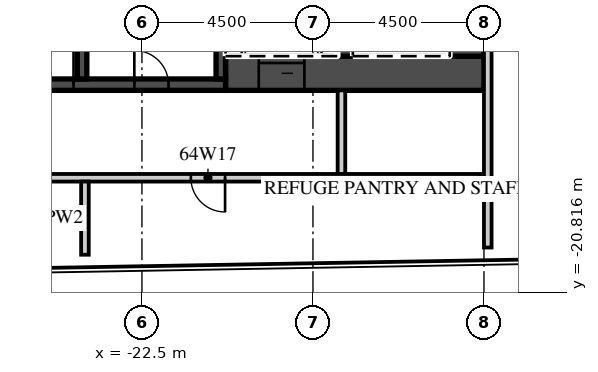
"""IFC4 building model, lengths in metres.
Left out: names, types, materials, properties, quantities, classifications, styles, units other than length and angle.
Written with IfcOpenShell. Run it as: python <this file> out.ifc"""

import sys

from ifc_helpers import new_model, si_unit, direction, frame, frame_2d, origin, place, context, subcontext, project, spatial, rectangle, extrude, element, fill, save


model = new_model("IFC4")
c1 = context("Model", 3, precision=1e-05, world=origin(), true_north=direction((0.0, 1.0)))
c2 = subcontext(c1, "Body", "Model", "MODEL_VIEW")
j1 = project(units=[si_unit("LENGTHUNIT", "METRE"), si_unit("PLANEANGLEUNIT", "RADIAN")], contexts=[c1])
p1 = place(None, origin())
s1 = spatial("IfcSite", under=j1, at=p1, CompositionType="ELEMENT")
p2 = place(p1, origin())
s2 = spatial("IfcBuilding", under=s1, at=p2, CompositionType="ELEMENT")
p3 = place(p2, frame((0.0, 0.0, 257.3)))
s3 = spatial("IfcBuildingStorey", under=s2, at=p3, CompositionType="ELEMENT", Elevation=257.3)
p4 = place(p3, frame((-20.3, -15.05, 0.0), z_axis=(0.0, 0.0, 1.0), x_axis=(1.0, 0.0, 0.0)))
e1 = element("IfcWall", 1, at=p4, inside=s3, PredefinedType="SHEAR", context=c2, shape_type="SweptSolid", body=[
    extrude(rectangle(XDim=6.8, YDim=0.9, at=frame_2d((3.4, 0.0))), origin(), (0.0, 0.0, 1.0), 4.2),
])
p5 = place(p4, frame((0.875, 0.0, 0.0)))
e2 = element("IfcOpeningElement", 2, at=p5, cuts=e1, PredefinedType="OPENING", context=c2, shape_type="SweptSolid", body=[
    extrude(rectangle(XDim=1.2, YDim=2.1, at=frame_2d((0.6, 1.05))), frame((0.0, 0.46, 0.0), z_axis=(0.0, -1.0, 0.0), x_axis=(1.0, 0.0, 0.0)), (0.0, 0.0, 1.0), 0.92),
])
p6 = place(p3, frame((-30.6, -15.35, 0.0), z_axis=(0.0, 0.0, 1.0), x_axis=(1.0, 0.0, 0.0)))
e3 = element("IfcWall", 3, at=p6, inside=s3, PredefinedType="SHEAR", context=c2, shape_type="SweptSolid", body=[
    extrude(rectangle(XDim=10.3, YDim=0.3, at=frame_2d((5.15, 0.0))), origin(), (0.0, 0.0, 1.0), 4.2),
])
p7 = place(p6, frame((5.0, 0.0, 0.0)))
e4 = element("IfcOpeningElement", 4, at=p7, cuts=e3, PredefinedType="OPENING", context=c2, shape_type="SweptSolid", body=[
    extrude(rectangle(XDim=1.3, YDim=2.1, at=frame_2d((0.65, 1.05))), frame((0.0, 0.16, 0.0), z_axis=(0.0, -1.0, 0.0), x_axis=(1.0, 0.0, 0.0)), (0.0, 0.0, 1.0), 0.32),
])
p8 = place(p6, frame((7.9, 0.0, 0.0)))
e5 = element("IfcOpeningElement", 5, at=p8, cuts=e3, PredefinedType="OPENING", context=c2, shape_type="SweptSolid", body=[
    extrude(rectangle(XDim=0.9, YDim=2.1, at=frame_2d((0.45, 1.05))), frame((0.0, 0.16, 0.0), z_axis=(0.0, -1.0, 0.0), x_axis=(1.0, 0.0, 0.0)), (0.0, 0.0, 1.0), 0.32),
])
p9 = place(p3, frame((-13.95, -14.6, 0.0), z_axis=(0.0, 0.0, 1.0), x_axis=(0.0, 1.0, 0.0)))
e6 = element("IfcWall", 6, at=p9, inside=s3, PredefinedType="SHEAR", context=c2, shape_type="SweptSolid", body=[
    extrude(rectangle(XDim=12.2, YDim=0.9, at=frame_2d((6.1, 0.0))), origin(), (0.0, 0.0, 1.0), 4.2),
])
p10 = place(p3, frame((-17.15, -14.6, 0.0), z_axis=(0.0, 0.0, 1.0), x_axis=(0.0, 1.0, 0.0)))
e7 = element("IfcWall", 7, at=p10, inside=s3, PredefinedType="SHEAR", context=c2, shape_type="SweptSolid", body=[
    extrude(rectangle(XDim=5.8, YDim=0.4, at=frame_2d((2.9, 0.0))), origin(), (0.0, 0.0, 1.0), 4.2),
])
for number, where, z_axis, x_axis in (
    (8, (-20.425, -15.2, 0.0), (0.0, 0.0, 1.0), (0.0, 1.0, 0.0)),
    (9, (-24.075, -15.2, 0.0), (0.0, 0.0, 1.0), (0.0, 1.0, 0.0)),
):
    element("IfcWall", number, at=place(p3, frame(where, z_axis=z_axis, x_axis=x_axis)), inside=s3, PredefinedType="SHEAR", context=c2, shape_type="SweptSolid", body=[
        extrude(rectangle(XDim=3.25, YDim=0.25, at=frame_2d((1.625, 0.0))), origin(), (0.0, 0.0, 1.0), 4.2),
    ])
p11 = place(p3, frame((-17.25, -17.7, 0.0), z_axis=(0.0, 0.0, 1.0), x_axis=(0.0, 1.0, 0.0)))
e10 = element("IfcWall", 10, at=p11, inside=s3, PredefinedType="PARTITIONING", context=c2, shape_type="SweptSolid", body=[
    extrude(rectangle(XDim=2.2, YDim=0.2, at=frame_2d((1.1, 0.0))), origin(), (0.0, 0.0, 1.0), 4.2),
])
p12 = place(p3, frame((-35.864, -17.8, 0.0), z_axis=(0.0, 0.0, 1.0), x_axis=(1.0, 0.0, 0.0)))
e11 = element("IfcWall", 11, at=p12, inside=s3, PredefinedType="PARTITIONING", context=c2, shape_type="SweptSolid", body=[
    extrude(rectangle(XDim=22.264, YDim=0.2, at=frame_2d((11.132, 0.0))), origin(), (0.0, 0.0, 1.0), 4.2),
])
p13 = place(p12, frame((6.351, 0.0, 0.0)))
e12 = element("IfcOpeningElement", 12, at=p13, cuts=e11, PredefinedType="OPENING", context=c2, shape_type="SweptSolid", body=[
    extrude(rectangle(XDim=0.9, YDim=2.1, at=frame_2d((0.45, 1.05))), frame((0.0, 0.11, 0.0), z_axis=(0.0, -1.0, 0.0), x_axis=(1.0, 0.0, 0.0)), (0.0, 0.0, 1.0), 0.22),
])
p14 = place(p12, frame((14.651, 0.0, 0.0)))
e13 = element("IfcOpeningElement", 13, at=p14, cuts=e11, PredefinedType="OPENING", context=c2, shape_type="SweptSolid", body=[
    extrude(rectangle(XDim=0.9, YDim=2.1, at=frame_2d((0.45, 1.05))), frame((0.0, 0.11, 0.0), z_axis=(0.0, -1.0, 0.0), x_axis=(1.0, 0.0, 0.0)), (0.0, 0.0, 1.0), 0.22),
])
p15 = place(p3, frame((-24.0, -19.824, 0.0), z_axis=(0.0, 0.0, 1.0), x_axis=(0.0, 1.0, 0.0)))
e14 = element("IfcWall", 14, at=p15, inside=s3, PredefinedType="PARTITIONING", context=c2, shape_type="SweptSolid", body=[
    extrude(rectangle(XDim=1.925, YDim=0.2, at=frame_2d((0.962, 0.0))), origin(), (0.0, 0.0, 1.0), 4.2),
])
p16 = place(p3, frame((-13.4, -19.636, 0.0), z_axis=(0.0, 0.0, 1.0), x_axis=(0.0, 1.0, 0.0)))
e15 = element("IfcWall", 15, at=p16, inside=s3, PredefinedType="PARTITIONING", context=c2, shape_type="SweptSolid", body=[
    extrude(rectangle(XDim=18.036, YDim=0.2, at=frame_2d((9.018, 0.0))), origin(), (0.0, 0.0, 1.0), 4.2),
])
p17 = place(p5, origin())
e16 = element("IfcDoor", 16, at=p17, inside=s3, OperationType="SLIDING_TO_LEFT", PredefinedType="DOOR", context=c2, shape_type="SweptSolid", body=[
    extrude(rectangle(XDim=1.2, YDim=2.1, at=frame_2d((0.6, 1.05))), frame((0.0, 0.025, 0.0), z_axis=(0.0, -1.0, 0.0), x_axis=(1.0, 0.0, 0.0)), (0.0, 0.0, 1.0), 0.05),
])
fill(e2, e16)
p18 = place(p7, origin())
e17 = element("IfcDoor", 17, at=p18, inside=s3, OperationType="SINGLE_SWING_RIGHT", PredefinedType="DOOR", context=c2, shape_type="SweptSolid", body=[
    extrude(rectangle(XDim=1.3, YDim=2.1, at=frame_2d((0.65, 1.05))), frame((0.0, 0.025, 0.0), z_axis=(0.0, -1.0, 0.0), x_axis=(1.0, 0.0, 0.0)), (0.0, 0.0, 1.0), 0.05),
])
fill(e4, e17)
p19 = place(p8, origin())
e18 = element("IfcDoor", 18, at=p19, inside=s3, OperationType="SINGLE_SWING_LEFT", PredefinedType="DOOR", context=c2, shape_type="SweptSolid", body=[
    extrude(rectangle(XDim=0.9, YDim=2.1, at=frame_2d((0.45, 1.05))), frame((0.0, 0.025, 0.0), z_axis=(0.0, -1.0, 0.0), x_axis=(1.0, 0.0, 0.0)), (0.0, 0.0, 1.0), 0.05),
])
fill(e5, e18)
p20 = place(p14, origin())
e19 = element("IfcDoor", 19, at=p20, inside=s3, OperationType="SINGLE_SWING_RIGHT", PredefinedType="DOOR", context=c2, shape_type="SweptSolid", body=[
    extrude(rectangle(XDim=0.9, YDim=2.1, at=frame_2d((0.45, 1.05))), frame((0.0, 0.025, 0.0), z_axis=(0.0, -1.0, 0.0), x_axis=(1.0, 0.0, 0.0)), (0.0, 0.0, 1.0), 0.05),
])
fill(e13, e19)
save(model, sys.argv[1])
